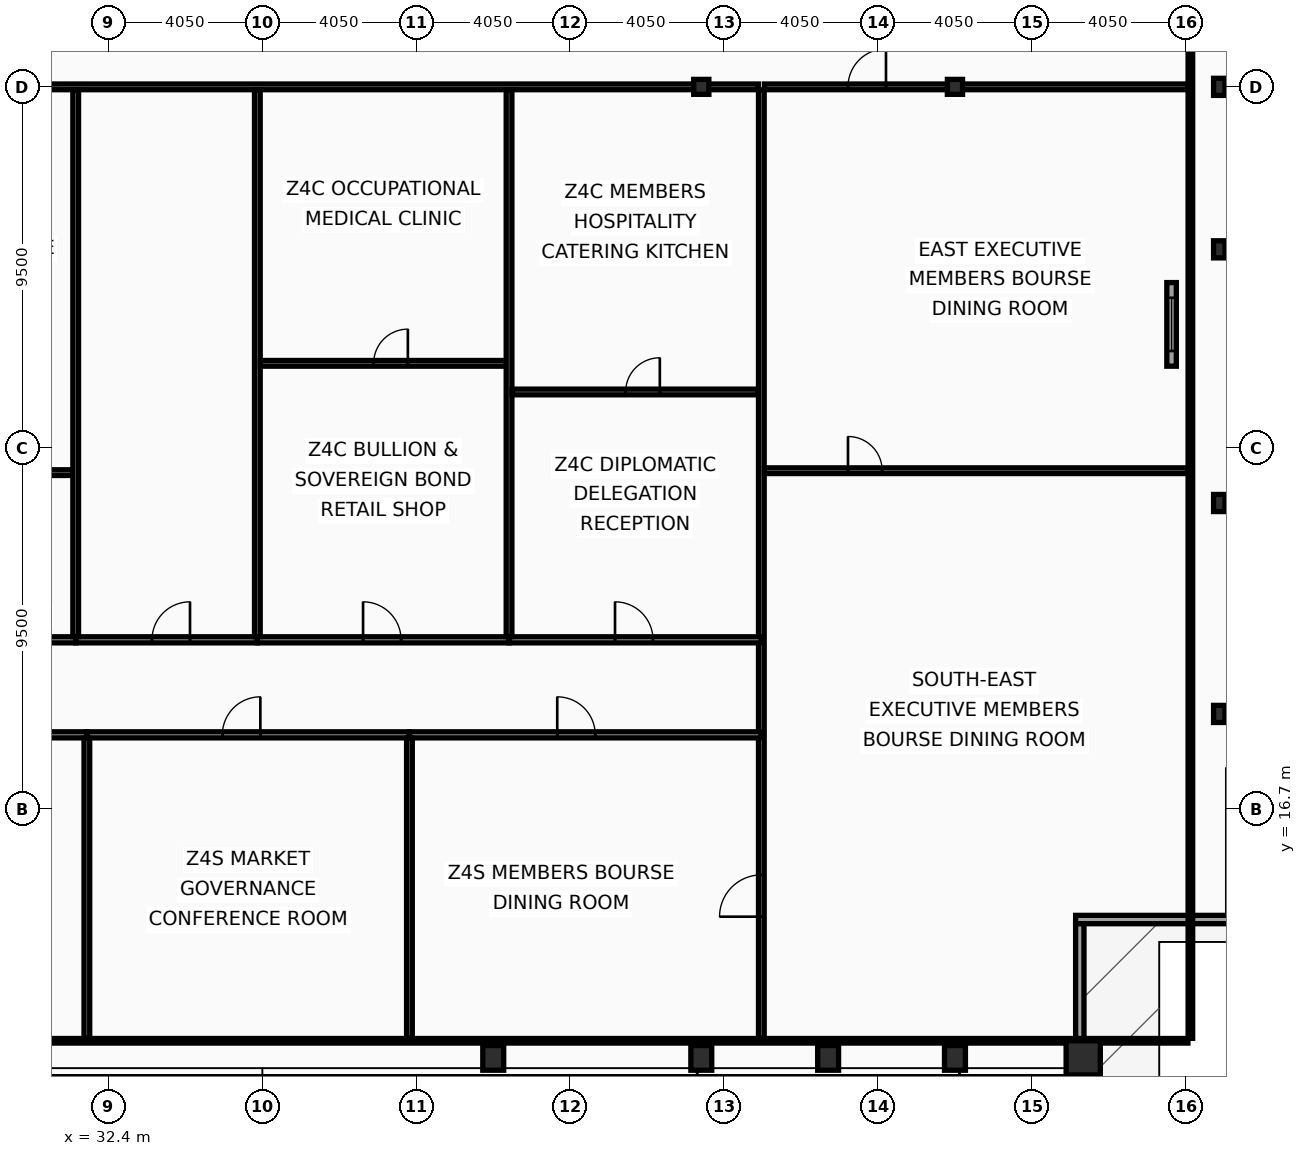
"""IFC4 building model, lengths in metres.
Left out: names, types, materials, properties, quantities, classifications, styles, units other than length and angle.
Written with IfcOpenShell. Run it as: python <this file> out.ifc"""

import sys

from ifc_helpers import new_model, si_unit, direction, frame, frame_2d, origin, origin_2d, place, context, subcontext, project, spatial, rectangle, hollow_rectangle, i_section, extrude, element, fill, save


model = new_model("IFC4")
c1 = context("Model", 3, precision=1e-05, world=origin(), true_north=direction((0.0, 1.0)))
c2 = subcontext(c1, "Body", "Model", "MODEL_VIEW")
j1 = project(units=[si_unit("LENGTHUNIT", "METRE"), si_unit("PLANEANGLEUNIT", "RADIAN")], contexts=[c1])
p1 = place(None, origin())
s1 = spatial("IfcSite", under=j1, at=p1, CompositionType="ELEMENT")
p2 = place(p1, origin())
s2 = spatial("IfcBuilding", under=s1, at=p2, CompositionType="ELEMENT")
p3 = place(p2, frame((0.0, 0.0, 291.4)))
s3 = spatial("IfcBuildingStorey", under=s2, at=p3, CompositionType="ELEMENT", Elevation=291.4)
p4 = place(p3, frame((58.05, 10.15, 0.0), z_axis=(0.0, 0.0, 1.0), x_axis=(1.0, 0.0, 0.0)))
e1 = element("IfcColumn", 1, at=p4, inside=s3, PredefinedType="COLUMN", context=c2, shape_type="SweptSolid", body=[
    extrude(hollow_rectangle(XDim=0.9, YDim=0.9, WallThickness=0.05, at=origin_2d()), origin(), (0.0, 0.0, 1.0), 3.6),
])
for number, where, z_axis, x_axis in (
    (2, (42.525, 10.15, 0.0), (0.0, 0.0, 1.0), (1.0, 0.0, 0.0)),
    (3, (48.0, 10.15, 0.0), (0.0, 0.0, 1.0), (1.0, 0.0, 0.0)),
    (4, (51.337, 10.15, 0.0), (0.0, 0.0, 1.0), (1.0, 0.0, 0.0)),
    (5, (54.675, 10.15, 0.0), (0.0, 0.0, 1.0), (1.0, 0.0, 0.0)),
):
    element("IfcColumn", number, at=place(p3, frame(where, z_axis=z_axis, x_axis=x_axis)), inside=s3, PredefinedType="COLUMN", context=c2, shape_type="SweptSolid", body=[
        extrude(hollow_rectangle(XDim=0.55, YDim=0.65, WallThickness=0.04, at=origin_2d()), origin(), (0.0, 0.0, 1.0), 3.6),
    ])
for number, where, z_axis, x_axis in (
    (6, (61.63, 19.2, 0.0), (0.0, 0.0, 1.0), (1.0, 0.0, 0.0)),
    (7, (61.63, 24.75, 0.0), (0.0, 0.0, 1.0), (1.0, 0.0, 0.0)),
    (8, (61.63, 31.425, 0.0), (0.0, 0.0, 1.0), (1.0, 0.0, 0.0)),
    (9, (61.63, 35.7, 0.0), (0.0, 0.0, 1.0), (1.0, 0.0, 0.0)),
):
    element("IfcColumn", number, at=place(p3, frame(where, z_axis=z_axis, x_axis=x_axis)), inside=s3, PredefinedType="COLUMN", context=c2, shape_type="SweptSolid", body=[
        extrude(i_section(OverallWidth=0.3, OverallDepth=0.45, WebThickness=0.014, FlangeThickness=0.026, at=origin_2d()), origin(), (0.0, 0.0, 1.0), 3.6),
    ])
for number, where, z_axis, x_axis in (
    (10, (48.0, 35.7, 0.0), (0.0, 0.0, 1.0), (1.0, 0.0, 0.0)),
    (11, (54.675, 35.7, 0.0), (0.0, 0.0, 1.0), (1.0, 0.0, 0.0)),
):
    element("IfcColumn", number, at=place(p3, frame(where, z_axis=z_axis, x_axis=x_axis)), inside=s3, PredefinedType="COLUMN", context=c2, shape_type="SweptSolid", body=[
        extrude(i_section(OverallWidth=0.399, OverallDepth=0.393, WebThickness=0.023, FlangeThickness=0.037, at=origin_2d()), origin(), (0.0, 0.0, 1.0), 3.6),
    ])
p5 = place(p3, frame((62.07, 13.79, 0.0), z_axis=(0.0, 0.0, 1.0), x_axis=(-1.0, 0.0, 0.0)))
e12 = element("IfcWall", 12, at=p5, inside=s3, PredefinedType="SOLIDWALL", context=c2, shape_type="SweptSolid", body=[
    extrude(rectangle(XDim=4.22, YDim=0.22, at=frame_2d((2.11, 0.0))), origin(), (0.0, 0.0, 1.0), 2.88),
])
p6 = place(p3, frame((57.96, 13.68, 0.0), z_axis=(0.0, 0.0, 1.0), x_axis=(0.0, -1.0, 0.0)))
e13 = element("IfcWall", 13, at=p6, inside=s3, PredefinedType="SOLIDWALL", context=c2, shape_type="SweptSolid", body=[
    extrude(rectangle(XDim=3.91, YDim=0.22, at=frame_2d((1.955, 0.0))), origin(), (0.0, 0.0, 1.0), 2.88),
])
p7 = place(p3, frame((60.375, 28.35, 0.0), z_axis=(0.0, 0.0, 1.0), x_axis=(0.0, 1.0, 0.0)))
e14 = element("IfcWall", 14, at=p7, inside=s3, PredefinedType="PARAPET", context=c2, shape_type="SweptSolid", body=[
    extrude(rectangle(XDim=2.2, YDim=0.25, at=frame_2d((1.1, 0.0))), origin(), (0.0, 0.0, 1.0), 0.88),
])
p8 = place(p7, frame((0.4, 0.0, 0.16)))
e15 = element("IfcOpeningElement", 15, at=p8, cuts=e14, PredefinedType="OPENING", context=c2, shape_type="SweptSolid", body=[
    extrude(rectangle(XDim=1.4, YDim=0.5, at=frame_2d((0.7, 0.25))), frame((0.0, 0.135, 0.0), z_axis=(0.0, -1.0, 0.0), x_axis=(1.0, 0.0, 0.0)), (0.0, 0.0, 1.0), 0.27),
])
p9 = place(p3, frame((49.58, 10.665, 0.0), z_axis=(0.0, 0.0, 1.0), x_axis=(0.0, 1.0, 0.0)))
e16 = element("IfcWall", 16, at=p9, inside=s3, PredefinedType="PARTITIONING", context=c2, shape_type="SweptSolid", body=[
    extrude(rectangle(XDim=24.955, YDim=0.15, at=frame_2d((12.478, 0.0))), origin(), (0.0, 0.0, 1.0), 3.03),
])
p10 = place(p9, frame((3.2, 0.0, 0.0)))
e17 = element("IfcOpeningElement", 17, at=p10, cuts=e16, PredefinedType="OPENING", context=c2, shape_type="SweptSolid", body=[
    extrude(rectangle(XDim=1.1, YDim=2.1, at=frame_2d((0.55, 1.05))), frame((0.0, 0.085, 0.0), z_axis=(0.0, -1.0, 0.0), x_axis=(1.0, 0.0, 0.0)), (0.0, 0.0, 1.0), 0.17),
])
p11 = place(p3, frame((24.48, 35.7, 0.0), z_axis=(0.0, 0.0, 1.0), x_axis=(1.0, 0.0, 0.0)))
e18 = element("IfcWall", 18, at=p11, inside=s3, PredefinedType="PARTITIONING", context=c2, shape_type="SweptSolid", body=[
    extrude(rectangle(XDim=25.02, YDim=0.15, at=frame_2d((12.51, 0.0))), origin(), (0.0, 0.0, 1.0), 2.78),
])
p12 = place(p3, frame((49.66, 35.7, 0.0), z_axis=(0.0, 0.0, 1.0), x_axis=(1.0, 0.0, 0.0)))
e19 = element("IfcWall", 19, at=p12, inside=s3, PredefinedType="PARTITIONING", context=c2, shape_type="SweptSolid", body=[
    extrude(rectangle(XDim=11.145, YDim=0.15, at=frame_2d((5.573, 0.0))), origin(), (0.0, 0.0, 1.0), 2.78),
])
p13 = place(p12, frame((2.2, 0.0, 0.0)))
e20 = element("IfcOpeningElement", 20, at=p13, cuts=e19, PredefinedType="OPENING", context=c2, shape_type="SweptSolid", body=[
    extrude(rectangle(XDim=1.0, YDim=2.05, at=frame_2d((0.5, 1.025))), frame((0.0, 0.085, 0.0), z_axis=(0.0, -1.0, 0.0), x_axis=(1.0, 0.0, 0.0)), (0.0, 0.0, 1.0), 0.17),
])
p14 = place(p3, frame((49.66, 25.6, 0.0), z_axis=(0.0, 0.0, 1.0), x_axis=(1.0, 0.0, 0.0)))
e21 = element("IfcWall", 21, at=p14, inside=s3, PredefinedType="PARTITIONING", context=c2, shape_type="SweptSolid", body=[
    extrude(rectangle(XDim=11.145, YDim=0.15, at=frame_2d((5.573, 0.0))), origin(), (0.0, 0.0, 1.0), 2.78),
])
p15 = place(p14, frame((2.2, 0.0, 0.0)))
e22 = element("IfcOpeningElement", 22, at=p15, cuts=e21, PredefinedType="OPENING", context=c2, shape_type="SweptSolid", body=[
    extrude(rectangle(XDim=0.9, YDim=2.05, at=frame_2d((0.45, 1.025))), frame((0.0, 0.085, 0.0), z_axis=(0.0, -1.0, 0.0), x_axis=(1.0, 0.0, 0.0)), (0.0, 0.0, 1.0), 0.17),
])
p16 = place(p3, frame((24.4, 21.15, 0.0), z_axis=(0.0, 0.0, 1.0), x_axis=(1.0, 0.0, 0.0)))
e23 = element("IfcWall", 23, at=p16, inside=s3, PredefinedType="PARTITIONING", context=c2, shape_type="SweptSolid", body=[
    extrude(rectangle(XDim=7.138, YDim=0.16, at=frame_2d((3.569, 0.0))), origin(), (0.0, 0.0, 1.0), 2.78),
])
p17 = place(p16, frame((2.998, 0.0, 0.0)))
e24 = element("IfcOpeningElement", 24, at=p17, cuts=e23, PredefinedType="OPENING", context=c2, shape_type="SweptSolid", body=[
    extrude(rectangle(XDim=1.0, YDim=2.05, at=frame_2d((0.5, 1.025))), frame((0.0, 0.09, 0.0), z_axis=(0.0, -1.0, 0.0), x_axis=(1.0, 0.0, 0.0)), (0.0, 0.0, 1.0), 0.18),
])
p18 = place(p3, frame((24.48, 25.55, 0.0), z_axis=(0.0, 0.0, 1.0), x_axis=(1.0, 0.0, 0.0)))
e25 = element("IfcWall", 25, at=p18, inside=s3, PredefinedType="PARTITIONING", context=c2, shape_type="SweptSolid", body=[
    extrude(rectangle(XDim=6.978, YDim=0.15, at=frame_2d((3.489, 0.0))), origin(), (0.0, 0.0, 1.0), 2.78),
])
p19 = place(p18, frame((3.212, 0.0, 0.0)))
e26 = element("IfcOpeningElement", 26, at=p19, cuts=e25, PredefinedType="OPENING", context=c2, shape_type="SweptSolid", body=[
    extrude(rectangle(XDim=0.9, YDim=2.05, at=frame_2d((0.45, 1.025))), frame((0.0, 0.085, 0.0), z_axis=(0.0, -1.0, 0.0), x_axis=(1.0, 0.0, 0.0)), (0.0, 0.0, 1.0), 0.17),
])
p20 = place(p3, frame((31.538, 21.15, 0.0), z_axis=(0.0, 0.0, 1.0), x_axis=(1.0, 0.0, 0.0)))
e27 = element("IfcWall", 27, at=p20, inside=s3, PredefinedType="PARTITIONING", context=c2, shape_type="SweptSolid", body=[
    extrude(rectangle(XDim=4.78, YDim=0.16, at=frame_2d((2.39, 0.0))), origin(), (0.0, 0.0, 1.0), 3.44),
])
p21 = place(p20, frame((2.008, 0.0, 0.0)))
e28 = element("IfcOpeningElement", 28, at=p21, cuts=e27, PredefinedType="OPENING", context=c2, shape_type="SweptSolid", body=[
    extrude(rectangle(XDim=1.0, YDim=2.05, at=frame_2d((0.5, 1.025))), frame((0.0, 0.09, 0.0), z_axis=(0.0, -1.0, 0.0), x_axis=(1.0, 0.0, 0.0)), (0.0, 0.0, 1.0), 0.18),
])
p22 = place(p3, frame((31.538, 21.235, 0.0), z_axis=(0.0, 0.0, 1.0), x_axis=(0.0, 1.0, 0.0)))
e29 = element("IfcWall", 29, at=p22, inside=s3, PredefinedType="PARTITIONING", context=c2, shape_type="SweptSolid", body=[
    extrude(rectangle(XDim=14.385, YDim=0.15, at=frame_2d((7.192, 0.0))), origin(), (0.0, 0.0, 1.0), 3.03),
])
p23 = place(p3, frame((36.318, 21.15, 0.0), z_axis=(0.0, 0.0, 1.0), x_axis=(1.0, 0.0, 0.0)))
e30 = element("IfcWall", 30, at=p23, inside=s3, PredefinedType="PARTITIONING", context=c2, shape_type="SweptSolid", body=[
    extrude(rectangle(XDim=6.623, YDim=0.16, at=frame_2d((3.312, 0.0))), origin(), (0.0, 0.0, 1.0), 2.78),
])
p24 = place(p23, frame((2.782, 0.0, 0.0)))
e31 = element("IfcOpeningElement", 31, at=p24, cuts=e30, PredefinedType="OPENING", context=c2, shape_type="SweptSolid", body=[
    extrude(rectangle(XDim=1.0, YDim=2.05, at=frame_2d((0.5, 1.025))), frame((0.0, 0.09, 0.0), z_axis=(0.0, -1.0, 0.0), x_axis=(1.0, 0.0, 0.0)), (0.0, 0.0, 1.0), 0.18),
])
p25 = place(p3, frame((36.318, 21.235, 0.0), z_axis=(0.0, 0.0, 1.0), x_axis=(0.0, 1.0, 0.0)))
e32 = element("IfcWall", 32, at=p25, inside=s3, PredefinedType="PARTITIONING", context=c2, shape_type="SweptSolid", body=[
    extrude(rectangle(XDim=14.385, YDim=0.15, at=frame_2d((7.192, 0.0))), origin(), (0.0, 0.0, 1.0), 3.03),
])
p26 = place(p3, frame((36.398, 28.425, 0.0), z_axis=(0.0, 0.0, 1.0), x_axis=(1.0, 0.0, 0.0)))
e33 = element("IfcWall", 33, at=p26, inside=s3, PredefinedType="PARTITIONING", context=c2, shape_type="SweptSolid", body=[
    extrude(rectangle(XDim=6.463, YDim=0.15, at=frame_2d((3.231, 0.0))), origin(), (0.0, 0.0, 1.0), 2.78),
])
p27 = place(p26, frame((2.98, 0.0, 0.0)))
e34 = element("IfcOpeningElement", 34, at=p27, cuts=e33, PredefinedType="OPENING", context=c2, shape_type="SweptSolid", body=[
    extrude(rectangle(XDim=0.9, YDim=2.05, at=frame_2d((0.45, 1.025))), frame((0.0, 0.085, 0.0), z_axis=(0.0, -1.0, 0.0), x_axis=(1.0, 0.0, 0.0)), (0.0, 0.0, 1.0), 0.17),
])
p28 = place(p3, frame((42.941, 21.15, 0.0), z_axis=(0.0, 0.0, 1.0), x_axis=(1.0, 0.0, 0.0)))
e35 = element("IfcWall", 35, at=p28, inside=s3, PredefinedType="PARTITIONING", context=c2, shape_type="SweptSolid", body=[
    extrude(rectangle(XDim=6.639, YDim=0.16, at=frame_2d((3.319, 0.0))), origin(), (0.0, 0.0, 1.0), 2.78),
])
p29 = place(p28, frame((2.788, 0.0, 0.0)))
e36 = element("IfcOpeningElement", 36, at=p29, cuts=e35, PredefinedType="OPENING", context=c2, shape_type="SweptSolid", body=[
    extrude(rectangle(XDim=1.0, YDim=2.05, at=frame_2d((0.5, 1.025))), frame((0.0, 0.09, 0.0), z_axis=(0.0, -1.0, 0.0), x_axis=(1.0, 0.0, 0.0)), (0.0, 0.0, 1.0), 0.18),
])
p30 = place(p3, frame((42.941, 21.235, 0.0), z_axis=(0.0, 0.0, 1.0), x_axis=(0.0, 1.0, 0.0)))
e37 = element("IfcWall", 37, at=p30, inside=s3, PredefinedType="PARTITIONING", context=c2, shape_type="SweptSolid", body=[
    extrude(rectangle(XDim=14.385, YDim=0.15, at=frame_2d((7.192, 0.0))), origin(), (0.0, 0.0, 1.0), 2.78),
])
p31 = place(p3, frame((43.021, 27.672, 0.0), z_axis=(0.0, 0.0, 1.0), x_axis=(1.0, 0.0, 0.0)))
e38 = element("IfcWall", 38, at=p31, inside=s3, PredefinedType="PARTITIONING", context=c2, shape_type="SweptSolid", body=[
    extrude(rectangle(XDim=6.479, YDim=0.15, at=frame_2d((3.24, 0.0))), origin(), (0.0, 0.0, 1.0), 2.78),
])
p32 = place(p31, frame((2.988, 0.0, 0.0)))
e39 = element("IfcOpeningElement", 39, at=p32, cuts=e38, PredefinedType="OPENING", context=c2, shape_type="SweptSolid", body=[
    extrude(rectangle(XDim=0.9, YDim=2.05, at=frame_2d((0.45, 1.025))), frame((0.0, 0.085, 0.0), z_axis=(0.0, -1.0, 0.0), x_axis=(1.0, 0.0, 0.0)), (0.0, 0.0, 1.0), 0.17),
])
p33 = place(p3, frame((21.8, 18.65, 0.0), z_axis=(0.0, 0.0, 1.0), x_axis=(1.0, 0.0, 0.0)))
e40 = element("IfcWall", 40, at=p33, inside=s3, PredefinedType="PARTITIONING", context=c2, shape_type="SweptSolid", body=[
    extrude(rectangle(XDim=10.032, YDim=0.16, at=frame_2d((5.016, 0.0))), origin(), (0.0, 0.0, 1.0), 2.78),
])
p34 = place(p33, frame((4.213, 0.0, 0.0)))
e41 = element("IfcOpeningElement", 41, at=p34, cuts=e40, PredefinedType="OPENING", context=c2, shape_type="SweptSolid", body=[
    extrude(rectangle(XDim=1.0, YDim=2.05, at=frame_2d((0.5, 1.025))), frame((0.0, 0.09, 0.0), z_axis=(0.0, -1.0, 0.0), x_axis=(1.0, 0.0, 0.0)), (0.0, 0.0, 1.0), 0.18),
])
p35 = place(p3, frame((31.832, 18.65, 0.0), z_axis=(0.0, 0.0, 1.0), x_axis=(1.0, 0.0, 0.0)))
e42 = element("IfcWall", 42, at=p35, inside=s3, PredefinedType="PARTITIONING", context=c2, shape_type="SweptSolid", body=[
    extrude(rectangle(XDim=8.488, YDim=0.16, at=frame_2d((4.244, 0.0))), origin(), (0.0, 0.0, 1.0), 3.44),
])
p36 = place(p35, frame((3.565, 0.0, 0.0)))
e43 = element("IfcOpeningElement", 43, at=p36, cuts=e42, PredefinedType="OPENING", context=c2, shape_type="SweptSolid", body=[
    extrude(rectangle(XDim=1.0, YDim=2.05, at=frame_2d((0.5, 1.025))), frame((0.0, 0.09, 0.0), z_axis=(0.0, -1.0, 0.0), x_axis=(1.0, 0.0, 0.0)), (0.0, 0.0, 1.0), 0.18),
])
p37 = place(p3, frame((31.832, 10.665, 0.0), z_axis=(0.0, 0.0, 1.0), x_axis=(0.0, 1.0, 0.0)))
e44 = element("IfcWall", 44, at=p37, inside=s3, PredefinedType="PARTITIONING", context=c2, shape_type="SweptSolid", body=[
    extrude(rectangle(XDim=7.9, YDim=0.15, at=frame_2d((3.95, 0.0))), origin(), (0.0, 0.0, 1.0), 3.03),
])
p38 = place(p3, frame((40.32, 18.65, 0.0), z_axis=(0.0, 0.0, 1.0), x_axis=(1.0, 0.0, 0.0)))
e45 = element("IfcWall", 45, at=p38, inside=s3, PredefinedType="PARTITIONING", context=c2, shape_type="SweptSolid", body=[
    extrude(rectangle(XDim=9.26, YDim=0.16, at=frame_2d((4.63, 0.0))), origin(), (0.0, 0.0, 1.0), 2.78),
])
p39 = place(p38, frame((3.889, 0.0, 0.0)))
e46 = element("IfcOpeningElement", 46, at=p39, cuts=e45, PredefinedType="OPENING", context=c2, shape_type="SweptSolid", body=[
    extrude(rectangle(XDim=1.0, YDim=2.05, at=frame_2d((0.5, 1.025))), frame((0.0, 0.09, 0.0), z_axis=(0.0, -1.0, 0.0), x_axis=(1.0, 0.0, 0.0)), (0.0, 0.0, 1.0), 0.18),
])
p40 = place(p3, frame((40.32, 10.665, 0.0), z_axis=(0.0, 0.0, 1.0), x_axis=(0.0, 1.0, 0.0)))
e47 = element("IfcWall", 47, at=p40, inside=s3, PredefinedType="PARTITIONING", context=c2, shape_type="SweptSolid", body=[
    extrude(rectangle(XDim=7.9, YDim=0.15, at=frame_2d((3.95, 0.0))), origin(), (0.0, 0.0, 1.0), 3.03),
])
p41 = place(p3, frame((60.87, 10.665, 0.0), z_axis=(0.0, 0.0, 1.0), x_axis=(0.0, 1.0, 0.0)))
e48 = element("IfcWall", 48, at=p41, inside=s3, PredefinedType="PARTITIONING", context=c2, shape_type="SweptSolid", body=[
    extrude(rectangle(XDim=42.11, YDim=0.12, at=frame_2d((21.055, 0.0))), origin(), (0.0, 0.0, 1.0), 2.78),
])
p42 = place(p3, frame((12.095, 10.6, 0.0), z_axis=(0.0, 0.0, 1.0), x_axis=(1.0, 0.0, 0.0)))
e49 = element("IfcWall", 49, at=p42, inside=s3, PredefinedType="PARTITIONING", context=c2, shape_type="SweptSolid", body=[
    extrude(rectangle(XDim=48.71, YDim=0.12, at=frame_2d((24.355, 0.0))), origin(), (0.0, 0.0, 1.0), 2.78),
])
p43 = place(p8, origin())
e50 = element("IfcWindow", 50, at=p43, inside=s3, PartitioningType="SINGLE_PANEL", PredefinedType="SKYLIGHT", context=c2, shape_type="SweptSolid", body=[
    extrude(rectangle(XDim=1.4, YDim=0.5, at=frame_2d((0.7, 0.25))), frame((0.0, 0.03, 0.0), z_axis=(0.0, -1.0, 0.0), x_axis=(1.0, 0.0, 0.0)), (0.0, 0.0, 1.0), 0.06),
])
fill(e15, e50)
p44 = place(p10, origin())
e51 = element("IfcDoor", 51, at=p44, inside=s3, OperationType="SINGLE_SWING_LEFT", PredefinedType="DOOR", context=c2, shape_type="SweptSolid", body=[
    extrude(rectangle(XDim=1.1, YDim=2.1, at=frame_2d((0.55, 1.05))), frame((0.0, 0.025, 0.0), z_axis=(0.0, -1.0, 0.0), x_axis=(1.0, 0.0, 0.0)), (0.0, 0.0, 1.0), 0.05),
])
fill(e17, e51)
p45 = place(p13, origin())
e52 = element("IfcDoor", 52, at=p45, inside=s3, OperationType="SINGLE_SWING_RIGHT", PredefinedType="DOOR", context=c2, shape_type="SweptSolid", body=[
    extrude(rectangle(XDim=1.0, YDim=2.05, at=frame_2d((0.5, 1.025))), frame((0.0, 0.025, 0.0), z_axis=(0.0, -1.0, 0.0), x_axis=(1.0, 0.0, 0.0)), (0.0, 0.0, 1.0), 0.05),
])
fill(e20, e52)
p46 = place(p15, origin())
e53 = element("IfcDoor", 53, at=p46, inside=s3, OperationType="SINGLE_SWING_LEFT", PredefinedType="DOOR", context=c2, shape_type="SweptSolid", body=[
    extrude(rectangle(XDim=0.9, YDim=2.05, at=frame_2d((0.45, 1.025))), frame((0.0, 0.025, 0.0), z_axis=(0.0, -1.0, 0.0), x_axis=(1.0, 0.0, 0.0)), (0.0, 0.0, 1.0), 0.05),
])
fill(e22, e53)
p47 = place(p21, origin())
e54 = element("IfcDoor", 54, at=p47, inside=s3, OperationType="SINGLE_SWING_RIGHT", PredefinedType="DOOR", context=c2, shape_type="SweptSolid", body=[
    extrude(rectangle(XDim=1.0, YDim=2.05, at=frame_2d((0.5, 1.025))), frame((0.0, 0.025, 0.0), z_axis=(0.0, -1.0, 0.0), x_axis=(1.0, 0.0, 0.0)), (0.0, 0.0, 1.0), 0.05),
])
fill(e28, e54)
p48 = place(p24, origin())
e55 = element("IfcDoor", 55, at=p48, inside=s3, OperationType="SINGLE_SWING_LEFT", PredefinedType="DOOR", context=c2, shape_type="SweptSolid", body=[
    extrude(rectangle(XDim=1.0, YDim=2.05, at=frame_2d((0.5, 1.025))), frame((0.0, 0.025, 0.0), z_axis=(0.0, -1.0, 0.0), x_axis=(1.0, 0.0, 0.0)), (0.0, 0.0, 1.0), 0.05),
])
fill(e31, e55)
p49 = place(p27, origin())
e56 = element("IfcDoor", 56, at=p49, inside=s3, OperationType="SINGLE_SWING_RIGHT", PredefinedType="DOOR", context=c2, shape_type="SweptSolid", body=[
    extrude(rectangle(XDim=0.9, YDim=2.05, at=frame_2d((0.45, 1.025))), frame((0.0, 0.025, 0.0), z_axis=(0.0, -1.0, 0.0), x_axis=(1.0, 0.0, 0.0)), (0.0, 0.0, 1.0), 0.05),
])
fill(e34, e56)
p50 = place(p29, origin())
e57 = element("IfcDoor", 57, at=p50, inside=s3, OperationType="SINGLE_SWING_LEFT", PredefinedType="DOOR", context=c2, shape_type="SweptSolid", body=[
    extrude(rectangle(XDim=1.0, YDim=2.05, at=frame_2d((0.5, 1.025))), frame((0.0, 0.025, 0.0), z_axis=(0.0, -1.0, 0.0), x_axis=(1.0, 0.0, 0.0)), (0.0, 0.0, 1.0), 0.05),
])
fill(e36, e57)
p51 = place(p32, origin())
e58 = element("IfcDoor", 58, at=p51, inside=s3, OperationType="SINGLE_SWING_RIGHT", PredefinedType="DOOR", context=c2, shape_type="SweptSolid", body=[
    extrude(rectangle(XDim=0.9, YDim=2.05, at=frame_2d((0.45, 1.025))), frame((0.0, 0.025, 0.0), z_axis=(0.0, -1.0, 0.0), x_axis=(1.0, 0.0, 0.0)), (0.0, 0.0, 1.0), 0.05),
])
fill(e39, e58)
p52 = place(p36, origin())
e59 = element("IfcDoor", 59, at=p52, inside=s3, OperationType="SINGLE_SWING_RIGHT", PredefinedType="DOOR", context=c2, shape_type="SweptSolid", body=[
    extrude(rectangle(XDim=1.0, YDim=2.05, at=frame_2d((0.5, 1.025))), frame((0.0, 0.025, 0.0), z_axis=(0.0, -1.0, 0.0), x_axis=(1.0, 0.0, 0.0)), (0.0, 0.0, 1.0), 0.05),
])
fill(e43, e59)
p53 = place(p39, origin())
e60 = element("IfcDoor", 60, at=p53, inside=s3, OperationType="SINGLE_SWING_LEFT", PredefinedType="DOOR", context=c2, shape_type="SweptSolid", body=[
    extrude(rectangle(XDim=1.0, YDim=2.05, at=frame_2d((0.5, 1.025))), frame((0.0, 0.025, 0.0), z_axis=(0.0, -1.0, 0.0), x_axis=(1.0, 0.0, 0.0)), (0.0, 0.0, 1.0), 0.05),
])
fill(e46, e60)
save(model, sys.argv[1])
